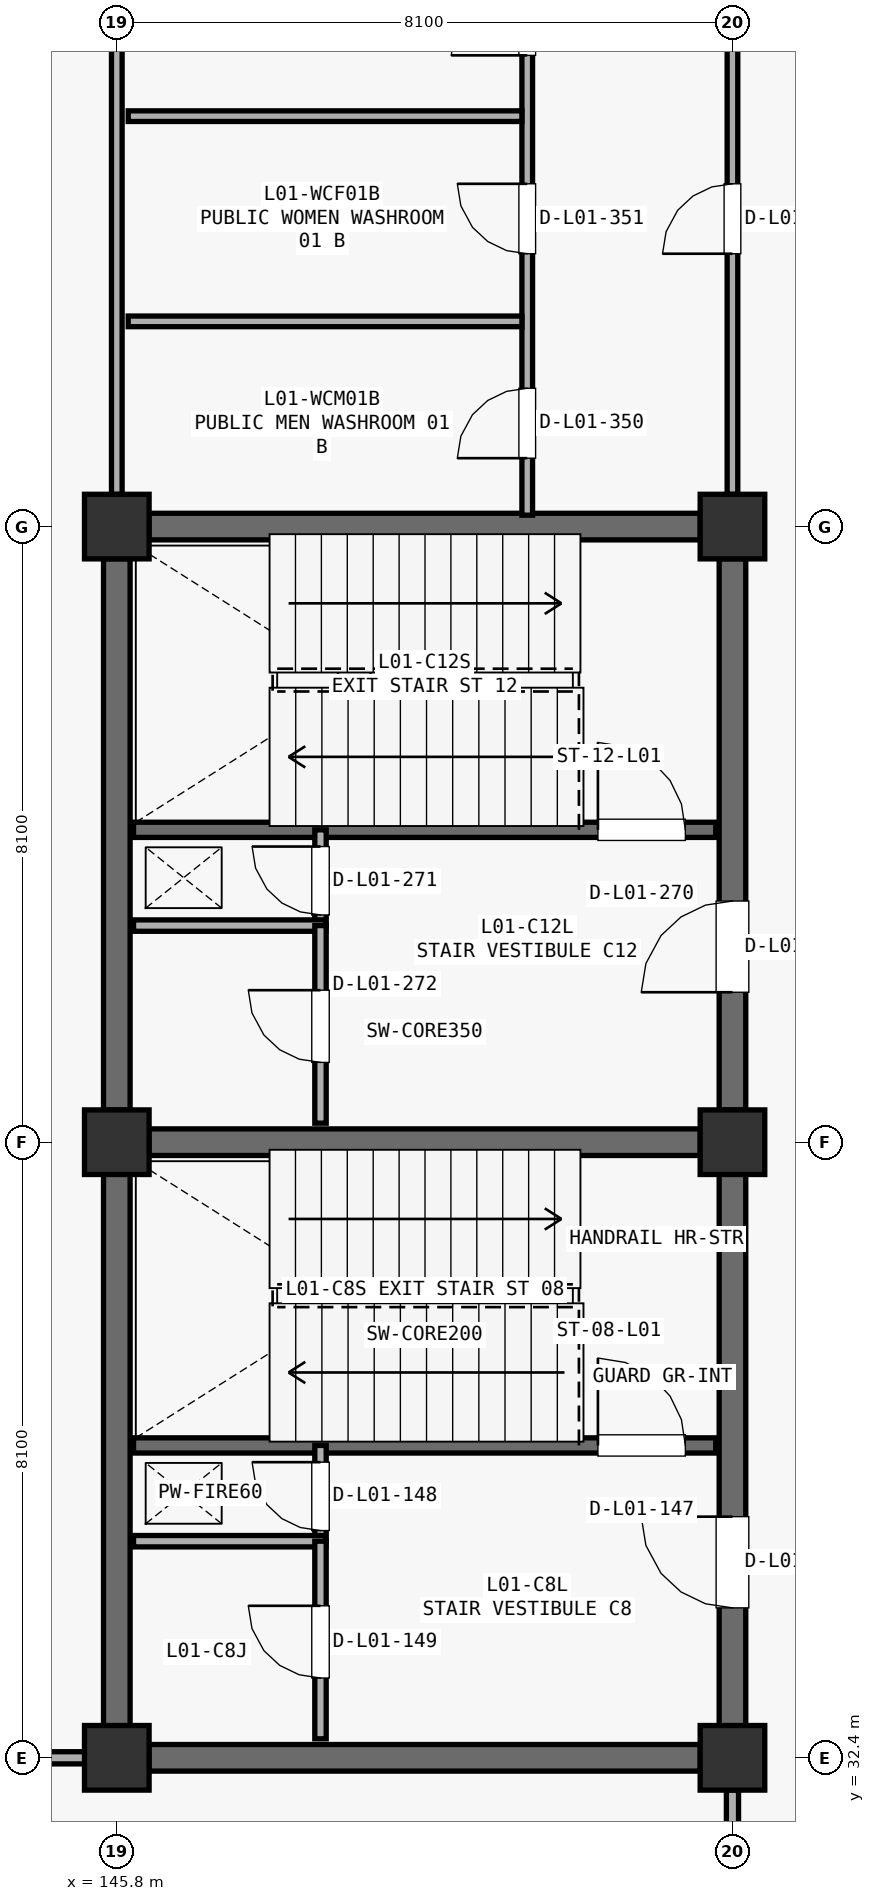
"""IFC4 building model, lengths in metres.
Left out: names, types, materials, properties, quantities, classifications, styles, units other than length and angle.
Written with IfcOpenShell. Run it as: python <this file> out.ifc"""

import sys

from ifc_helpers import new_model, si_unit, direction, frame, frame_2d, origin, origin_2d, place, context, subcontext, project, spatial, rectangle, extrude, element, fill, save


model = new_model("IFC4")
c1 = context("Model", 3, precision=1e-05, world=origin(), true_north=direction((0.0, 1.0)))
c2 = subcontext(c1, "Body", "Model", "MODEL_VIEW")
j1 = project(units=[si_unit("LENGTHUNIT", "METRE"), si_unit("PLANEANGLEUNIT", "RADIAN")], contexts=[c1])
p1 = place(None, origin())
s1 = spatial("IfcSite", under=j1, at=p1, CompositionType="ELEMENT")
p2 = place(p1, origin())
s2 = spatial("IfcBuilding", under=s1, at=p2, CompositionType="ELEMENT")
p3 = place(p2, frame((0.0, 0.0, 5.1)))
s3 = spatial("IfcBuildingStorey", under=s2, at=p3, CompositionType="ELEMENT", Elevation=5.1)
for number, where, z_axis, x_axis in (
    (1, (145.8, 32.4, 0.0), (0.0, 0.0, 1.0), (1.0, 0.0, 0.0)),
    (2, (145.8, 40.5, 0.0), (0.0, 0.0, 1.0), (1.0, 0.0, 0.0)),
    (3, (145.8, 48.6, 0.0), (0.0, 0.0, 1.0), (1.0, 0.0, 0.0)),
    (4, (153.9, 32.4, 0.0), (0.0, 0.0, 1.0), (1.0, 0.0, 0.0)),
    (5, (153.9, 40.5, 0.0), (0.0, 0.0, 1.0), (1.0, 0.0, 0.0)),
    (6, (153.9, 48.6, 0.0), (0.0, 0.0, 1.0), (1.0, 0.0, 0.0)),
):
    element("IfcColumn", number, at=place(p3, frame(where, z_axis=z_axis, x_axis=x_axis)), inside=s3, PredefinedType="COLUMN", context=c2, shape_type="SweptSolid", body=[
        extrude(rectangle(XDim=0.85, YDim=0.85, at=origin_2d()), origin(), (0.0, 0.0, 1.0), 4.59),
    ])
p4 = place(p3, frame((146.223, 40.5, 0.0), z_axis=(0.0, 0.0, 1.0), x_axis=(1.0, 0.0, 0.0)))
e7 = element("IfcWall", 7, at=p4, inside=s3, PredefinedType="SHEAR", context=c2, shape_type="SweptSolid", body=[
    extrude(rectangle(XDim=7.254, YDim=0.35, at=frame_2d((3.627, 0.0))), origin(), (0.0, 0.0, 1.0), 4.312),
])
p5 = place(p3, frame((145.8, 32.823, 0.0), z_axis=(0.0, 0.0, 1.0), x_axis=(0.0, 1.0, 0.0)))
e8 = element("IfcWall", 8, at=p5, inside=s3, PredefinedType="SHEAR", context=c2, shape_type="SweptSolid", body=[
    extrude(rectangle(XDim=7.254, YDim=0.35, at=frame_2d((3.627, 0.0))), origin(), (0.0, 0.0, 1.0), 4.312),
])
p6 = place(p3, frame((153.9, 32.823, 0.0), z_axis=(0.0, 0.0, 1.0), x_axis=(0.0, 1.0, 0.0)))
e9 = element("IfcWall", 9, at=p6, inside=s3, PredefinedType="SHEAR", context=c2, shape_type="SweptSolid", body=[
    extrude(rectangle(XDim=7.254, YDim=0.35, at=frame_2d((3.627, 0.0))), origin(), (0.0, 0.0, 1.0), 4.312),
])
p7 = place(p6, frame((1.55, 0.0, 0.0)))
e10 = element("IfcOpeningElement", 10, at=p7, cuts=e9, PredefinedType="OPENING", context=c2, shape_type="SweptSolid", body=[
    extrude(rectangle(XDim=1.2, YDim=2.2, at=frame_2d((0.6, 1.1))), frame((0.0, 0.185, 0.0), z_axis=(0.0, -1.0, 0.0), x_axis=(1.0, 0.0, 0.0)), (0.0, 0.0, 1.0), 0.37),
])
p8 = place(p3, frame((146.223, 32.4, 0.0), z_axis=(0.0, 0.0, 1.0), x_axis=(1.0, 0.0, 0.0)))
e11 = element("IfcWall", 11, at=p8, inside=s3, PredefinedType="SHEAR", context=c2, shape_type="SweptSolid", body=[
    extrude(rectangle(XDim=7.254, YDim=0.35, at=frame_2d((3.627, 0.0))), origin(), (0.0, 0.0, 1.0), 4.312),
])
p9 = place(p3, frame((146.02, 36.51, 0.0), z_axis=(0.0, 0.0, 1.0), x_axis=(1.0, 0.0, 0.0)))
e12 = element("IfcWall", 12, at=p9, inside=s3, PredefinedType="SHEAR", context=c2, shape_type="SweptSolid", body=[
    extrude(rectangle(XDim=7.66, YDim=0.2, at=frame_2d((3.83, 0.0))), origin(), (0.0, 0.0, 1.0), 4.312),
])
p10 = place(p9, frame((6.11, 0.0, 0.0)))
e13 = element("IfcOpeningElement", 13, at=p10, cuts=e12, PredefinedType="OPENING", context=c2, shape_type="SweptSolid", body=[
    extrude(rectangle(XDim=1.15, YDim=2.2, at=frame_2d((0.575, 1.1))), frame((0.0, 0.11, 0.0), z_axis=(0.0, -1.0, 0.0), x_axis=(1.0, 0.0, 0.0)), (0.0, 0.0, 1.0), 0.22),
])
p11 = place(p3, frame((148.48, 35.25, 0.0), z_axis=(0.0, 0.0, 1.0), x_axis=(0.0, 1.0, 0.0)))
e14 = element("IfcWall", 14, at=p11, inside=s3, PredefinedType="PARTITIONING", context=c2, shape_type="SweptSolid", body=[
    extrude(rectangle(XDim=1.26, YDim=0.15, at=frame_2d((0.63, 0.0))), origin(), (0.0, 0.0, 1.0), 4.312),
])
p12 = place(p11, frame((0.14, 0.0, 0.0)))
e15 = element("IfcOpeningElement", 15, at=p12, cuts=e14, PredefinedType="OPENING", context=c2, shape_type="SweptSolid", body=[
    extrude(rectangle(XDim=0.9, YDim=2.15, at=frame_2d((0.45, 1.075))), frame((0.0, 0.085, 0.0), z_axis=(0.0, -1.0, 0.0), x_axis=(1.0, 0.0, 0.0)), (0.0, 0.0, 1.0), 0.17),
])
p13 = place(p3, frame((146.02, 35.25, 0.0), z_axis=(0.0, 0.0, 1.0), x_axis=(1.0, 0.0, 0.0)))
e16 = element("IfcWall", 16, at=p13, inside=s3, PredefinedType="PARTITIONING", context=c2, shape_type="SweptSolid", body=[
    extrude(rectangle(XDim=2.53, YDim=0.15, at=frame_2d((1.265, 0.0))), origin(), (0.0, 0.0, 1.0), 4.312),
])
p14 = place(p3, frame((148.48, 32.65, 0.0), z_axis=(0.0, 0.0, 1.0), x_axis=(0.0, 1.0, 0.0)))
e17 = element("IfcWall", 17, at=p14, inside=s3, PredefinedType="PARTITIONING", context=c2, shape_type="SweptSolid", body=[
    extrude(rectangle(XDim=2.6, YDim=0.15, at=frame_2d((1.3, 0.0))), origin(), (0.0, 0.0, 1.0), 4.312),
])
p15 = place(p14, frame((0.8, 0.0, 0.0)))
e18 = element("IfcOpeningElement", 18, at=p15, cuts=e17, PredefinedType="OPENING", context=c2, shape_type="SweptSolid", body=[
    extrude(rectangle(XDim=0.95, YDim=2.15, at=frame_2d((0.475, 1.075))), frame((0.0, 0.085, 0.0), z_axis=(0.0, -1.0, 0.0), x_axis=(1.0, 0.0, 0.0)), (0.0, 0.0, 1.0), 0.17),
])
p16 = place(p3, frame((146.223, 48.6, 0.0), z_axis=(0.0, 0.0, 1.0), x_axis=(1.0, 0.0, 0.0)))
e19 = element("IfcWall", 19, at=p16, inside=s3, PredefinedType="SHEAR", context=c2, shape_type="SweptSolid", body=[
    extrude(rectangle(XDim=7.254, YDim=0.35, at=frame_2d((3.627, 0.0))), origin(), (0.0, 0.0, 1.0), 4.312),
])
p17 = place(p3, frame((145.8, 40.923, 0.0), z_axis=(0.0, 0.0, 1.0), x_axis=(0.0, 1.0, 0.0)))
e20 = element("IfcWall", 20, at=p17, inside=s3, PredefinedType="SHEAR", context=c2, shape_type="SweptSolid", body=[
    extrude(rectangle(XDim=7.254, YDim=0.35, at=frame_2d((3.627, 0.0))), origin(), (0.0, 0.0, 1.0), 4.312),
])
p18 = place(p3, frame((153.9, 40.923, 0.0), z_axis=(0.0, 0.0, 1.0), x_axis=(0.0, 1.0, 0.0)))
e21 = element("IfcWall", 21, at=p18, inside=s3, PredefinedType="SHEAR", context=c2, shape_type="SweptSolid", body=[
    extrude(rectangle(XDim=7.254, YDim=0.35, at=frame_2d((3.627, 0.0))), origin(), (0.0, 0.0, 1.0), 4.312),
])
p19 = place(p18, frame((1.55, 0.0, 0.0)))
e22 = element("IfcOpeningElement", 22, at=p19, cuts=e21, PredefinedType="OPENING", context=c2, shape_type="SweptSolid", body=[
    extrude(rectangle(XDim=1.2, YDim=2.2, at=frame_2d((0.6, 1.1))), frame((0.0, 0.185, 0.0), z_axis=(0.0, -1.0, 0.0), x_axis=(1.0, 0.0, 0.0)), (0.0, 0.0, 1.0), 0.37),
])
p20 = place(p3, frame((146.02, 44.61, 0.0), z_axis=(0.0, 0.0, 1.0), x_axis=(1.0, 0.0, 0.0)))
e23 = element("IfcWall", 23, at=p20, inside=s3, PredefinedType="SHEAR", context=c2, shape_type="SweptSolid", body=[
    extrude(rectangle(XDim=7.66, YDim=0.2, at=frame_2d((3.83, 0.0))), origin(), (0.0, 0.0, 1.0), 4.312),
])
p21 = place(p20, frame((6.11, 0.0, 0.0)))
e24 = element("IfcOpeningElement", 24, at=p21, cuts=e23, PredefinedType="OPENING", context=c2, shape_type="SweptSolid", body=[
    extrude(rectangle(XDim=1.15, YDim=2.2, at=frame_2d((0.575, 1.1))), frame((0.0, 0.11, 0.0), z_axis=(0.0, -1.0, 0.0), x_axis=(1.0, 0.0, 0.0)), (0.0, 0.0, 1.0), 0.22),
])
p22 = place(p3, frame((148.48, 43.35, 0.0), z_axis=(0.0, 0.0, 1.0), x_axis=(0.0, 1.0, 0.0)))
e25 = element("IfcWall", 25, at=p22, inside=s3, PredefinedType="PARTITIONING", context=c2, shape_type="SweptSolid", body=[
    extrude(rectangle(XDim=1.26, YDim=0.15, at=frame_2d((0.63, 0.0))), origin(), (0.0, 0.0, 1.0), 4.312),
])
p23 = place(p22, frame((0.14, 0.0, 0.0)))
e26 = element("IfcOpeningElement", 26, at=p23, cuts=e25, PredefinedType="OPENING", context=c2, shape_type="SweptSolid", body=[
    extrude(rectangle(XDim=0.9, YDim=2.15, at=frame_2d((0.45, 1.075))), frame((0.0, 0.085, 0.0), z_axis=(0.0, -1.0, 0.0), x_axis=(1.0, 0.0, 0.0)), (0.0, 0.0, 1.0), 0.17),
])
p24 = place(p3, frame((146.02, 43.35, 0.0), z_axis=(0.0, 0.0, 1.0), x_axis=(1.0, 0.0, 0.0)))
e27 = element("IfcWall", 27, at=p24, inside=s3, PredefinedType="PARTITIONING", context=c2, shape_type="SweptSolid", body=[
    extrude(rectangle(XDim=2.53, YDim=0.15, at=frame_2d((1.265, 0.0))), origin(), (0.0, 0.0, 1.0), 4.312),
])
p25 = place(p3, frame((148.48, 40.75, 0.0), z_axis=(0.0, 0.0, 1.0), x_axis=(0.0, 1.0, 0.0)))
e28 = element("IfcWall", 28, at=p25, inside=s3, PredefinedType="PARTITIONING", context=c2, shape_type="SweptSolid", body=[
    extrude(rectangle(XDim=2.6, YDim=0.15, at=frame_2d((1.3, 0.0))), origin(), (0.0, 0.0, 1.0), 4.312),
])
p26 = place(p25, frame((0.8, 0.0, 0.0)))
e29 = element("IfcOpeningElement", 29, at=p26, cuts=e28, PredefinedType="OPENING", context=c2, shape_type="SweptSolid", body=[
    extrude(rectangle(XDim=0.95, YDim=2.15, at=frame_2d((0.475, 1.075))), frame((0.0, 0.085, 0.0), z_axis=(0.0, -1.0, 0.0), x_axis=(1.0, 0.0, 0.0)), (0.0, 0.0, 1.0), 0.17),
])
p27 = place(p3, frame((145.8, 49.023, 0.0), z_axis=(0.0, 0.0, 1.0), x_axis=(0.0, 1.0, 0.0)))
e30 = element("IfcWall", 30, at=p27, inside=s3, PredefinedType="PARTITIONING", context=c2, shape_type="SweptSolid", body=[
    extrude(rectangle(XDim=7.254, YDim=0.14, at=frame_2d((3.627, 0.0))), origin(), (0.0, 0.0, 1.0), 3.36),
])
p28 = place(p3, frame((153.9, 49.023, 0.0), z_axis=(0.0, 0.0, 1.0), x_axis=(0.0, 1.0, 0.0)))
e31 = element("IfcWall", 31, at=p28, inside=s3, PredefinedType="PARTITIONING", context=c2, shape_type="SweptSolid", body=[
    extrude(rectangle(XDim=7.254, YDim=0.14, at=frame_2d((3.627, 0.0))), origin(), (0.0, 0.0, 1.0), 3.66),
])
p29 = place(p28, frame((3.167, 0.0, 0.0)))
e32 = element("IfcOpeningElement", 32, at=p29, cuts=e31, PredefinedType="OPENING", context=c2, shape_type="SweptSolid", body=[
    extrude(rectangle(XDim=0.92, YDim=2.15, at=frame_2d((0.46, 1.075))), frame((0.0, 0.08, 0.0), z_axis=(0.0, -1.0, 0.0), x_axis=(1.0, 0.0, 0.0)), (0.0, 0.0, 1.0), 0.16),
])
p30 = place(p3, frame((151.2, 48.75, 0.0), z_axis=(0.0, 0.0, 1.0), x_axis=(0.0, 1.0, 0.0)))
e33 = element("IfcWall", 33, at=p30, inside=s3, PredefinedType="PARTITIONING", context=c2, shape_type="SweptSolid", body=[
    extrude(rectangle(XDim=7.8, YDim=0.14, at=frame_2d((3.9, 0.0))), origin(), (0.0, 0.0, 1.0), 4.312),
])
p31 = place(p30, frame((0.75, 0.0, 0.0)))
e34 = element("IfcOpeningElement", 34, at=p31, cuts=e33, PredefinedType="OPENING", context=c2, shape_type="SweptSolid", body=[
    extrude(rectangle(XDim=0.92, YDim=2.15, at=frame_2d((0.46, 1.075))), frame((0.0, 0.08, 0.0), z_axis=(0.0, -1.0, 0.0), x_axis=(1.0, 0.0, 0.0)), (0.0, 0.0, 1.0), 0.16),
])
p32 = place(p30, frame((3.44, 0.0, 0.0)))
e35 = element("IfcOpeningElement", 35, at=p32, cuts=e33, PredefinedType="OPENING", context=c2, shape_type="SweptSolid", body=[
    extrude(rectangle(XDim=0.92, YDim=2.15, at=frame_2d((0.46, 1.075))), frame((0.0, 0.08, 0.0), z_axis=(0.0, -1.0, 0.0), x_axis=(1.0, 0.0, 0.0)), (0.0, 0.0, 1.0), 0.16),
])
p33 = place(p30, frame((6.05, 0.0, 0.0)))
e36 = element("IfcOpeningElement", 36, at=p33, cuts=e33, PredefinedType="OPENING", context=c2, shape_type="SweptSolid", body=[
    extrude(rectangle(XDim=1.0, YDim=2.15, at=frame_2d((0.5, 1.075))), frame((0.0, 0.08, 0.0), z_axis=(0.0, -1.0, 0.0), x_axis=(1.0, 0.0, 0.0)), (0.0, 0.0, 1.0), 0.16),
])
for number, where, z_axis, x_axis in (
    (37, (145.95, 51.3, 0.0), (0.0, 0.0, 1.0), (1.0, 0.0, 0.0)),
    (38, (145.95, 54.0, 0.0), (0.0, 0.0, 1.0), (1.0, 0.0, 0.0)),
):
    element("IfcWall", number, at=place(p3, frame(where, z_axis=z_axis, x_axis=x_axis)), inside=s3, PredefinedType="PARTITIONING", context=c2, shape_type="SweptSolid", body=[
        extrude(rectangle(XDim=5.18, YDim=0.14, at=frame_2d((2.59, 0.0))), origin(), (0.0, 0.0, 1.0), 4.312),
    ])
p34 = place(p3, frame((153.9, 24.723, 0.0), z_axis=(0.0, 0.0, 1.0), x_axis=(0.0, 1.0, 0.0)))
e39 = element("IfcWall", 39, at=p34, inside=s3, PredefinedType="PARTITIONING", context=c2, shape_type="SweptSolid", body=[
    extrude(rectangle(XDim=7.254, YDim=0.16, at=frame_2d((3.627, 0.0))), origin(), (0.0, 0.0, 1.0), 3.462),
])
p35 = place(p3, frame((138.123, 32.4, 0.0), z_axis=(0.0, 0.0, 1.0), x_axis=(1.0, 0.0, 0.0)))
e40 = element("IfcWall", 40, at=p35, inside=s3, PredefinedType="PARTITIONING", context=c2, shape_type="SweptSolid", body=[
    extrude(rectangle(XDim=7.254, YDim=0.16, at=frame_2d((3.627, 0.0))), origin(), (0.0, 0.0, 1.0), 3.462),
])
p36 = place(p7, origin())
e41 = element("IfcDoor", 41, at=p36, inside=s3, OperationType="SINGLE_SWING_RIGHT", PredefinedType="DOOR", context=c2, shape_type="SweptSolid", body=[
    extrude(rectangle(XDim=1.2, YDim=2.2, at=frame_2d((0.6, 1.1))), frame((0.0, 0.025, 0.0), z_axis=(0.0, -1.0, 0.0), x_axis=(1.0, 0.0, 0.0)), (0.0, 0.0, 1.0), 0.05),
])
fill(e10, e41)
p37 = place(p10, origin())
e42 = element("IfcDoor", 42, at=p37, inside=s3, OperationType="SINGLE_SWING_LEFT", PredefinedType="DOOR", context=c2, shape_type="SweptSolid", body=[
    extrude(rectangle(XDim=1.15, YDim=2.2, at=frame_2d((0.575, 1.1))), frame((0.0, 0.025, 0.0), z_axis=(0.0, -1.0, 0.0), x_axis=(1.0, 0.0, 0.0)), (0.0, 0.0, 1.0), 0.05),
])
fill(e13, e42)
p38 = place(p12, origin())
e43 = element("IfcDoor", 43, at=p38, inside=s3, OperationType="SINGLE_SWING_RIGHT", PredefinedType="DOOR", context=c2, shape_type="SweptSolid", body=[
    extrude(rectangle(XDim=0.9, YDim=2.15, at=frame_2d((0.45, 1.075))), frame((0.0, 0.025, 0.0), z_axis=(0.0, -1.0, 0.0), x_axis=(1.0, 0.0, 0.0)), (0.0, 0.0, 1.0), 0.05),
])
fill(e15, e43)
p39 = place(p15, origin())
e44 = element("IfcDoor", 44, at=p39, inside=s3, OperationType="SINGLE_SWING_RIGHT", PredefinedType="DOOR", context=c2, shape_type="SweptSolid", body=[
    extrude(rectangle(XDim=0.95, YDim=2.15, at=frame_2d((0.475, 1.075))), frame((0.0, 0.025, 0.0), z_axis=(0.0, -1.0, 0.0), x_axis=(1.0, 0.0, 0.0)), (0.0, 0.0, 1.0), 0.05),
])
fill(e18, e44)
p40 = place(p19, origin())
e45 = element("IfcDoor", 45, at=p40, inside=s3, OperationType="SINGLE_SWING_LEFT", PredefinedType="DOOR", context=c2, shape_type="SweptSolid", body=[
    extrude(rectangle(XDim=1.2, YDim=2.2, at=frame_2d((0.6, 1.1))), frame((0.0, 0.025, 0.0), z_axis=(0.0, -1.0, 0.0), x_axis=(1.0, 0.0, 0.0)), (0.0, 0.0, 1.0), 0.05),
])
fill(e22, e45)
p41 = place(p21, origin())
e46 = element("IfcDoor", 46, at=p41, inside=s3, OperationType="SINGLE_SWING_LEFT", PredefinedType="DOOR", context=c2, shape_type="SweptSolid", body=[
    extrude(rectangle(XDim=1.15, YDim=2.2, at=frame_2d((0.575, 1.1))), frame((0.0, 0.025, 0.0), z_axis=(0.0, -1.0, 0.0), x_axis=(1.0, 0.0, 0.0)), (0.0, 0.0, 1.0), 0.05),
])
fill(e24, e46)
p42 = place(p23, origin())
e47 = element("IfcDoor", 47, at=p42, inside=s3, OperationType="SINGLE_SWING_RIGHT", PredefinedType="DOOR", context=c2, shape_type="SweptSolid", body=[
    extrude(rectangle(XDim=0.9, YDim=2.15, at=frame_2d((0.45, 1.075))), frame((0.0, 0.025, 0.0), z_axis=(0.0, -1.0, 0.0), x_axis=(1.0, 0.0, 0.0)), (0.0, 0.0, 1.0), 0.05),
])
fill(e26, e47)
p43 = place(p26, origin())
e48 = element("IfcDoor", 48, at=p43, inside=s3, OperationType="SINGLE_SWING_RIGHT", PredefinedType="DOOR", context=c2, shape_type="SweptSolid", body=[
    extrude(rectangle(XDim=0.95, YDim=2.15, at=frame_2d((0.475, 1.075))), frame((0.0, 0.025, 0.0), z_axis=(0.0, -1.0, 0.0), x_axis=(1.0, 0.0, 0.0)), (0.0, 0.0, 1.0), 0.05),
])
fill(e29, e48)
p44 = place(p29, origin())
e49 = element("IfcDoor", 49, at=p44, inside=s3, OperationType="SINGLE_SWING_LEFT", PredefinedType="DOOR", context=c2, shape_type="SweptSolid", body=[
    extrude(rectangle(XDim=0.92, YDim=2.15, at=frame_2d((0.46, 1.075))), frame((0.0, 0.025, 0.0), z_axis=(0.0, -1.0, 0.0), x_axis=(1.0, 0.0, 0.0)), (0.0, 0.0, 1.0), 0.05),
])
fill(e32, e49)
p45 = place(p31, origin())
e50 = element("IfcDoor", 50, at=p45, inside=s3, OperationType="SINGLE_SWING_LEFT", PredefinedType="DOOR", context=c2, shape_type="SweptSolid", body=[
    extrude(rectangle(XDim=0.92, YDim=2.15, at=frame_2d((0.46, 1.075))), frame((0.0, 0.025, 0.0), z_axis=(0.0, -1.0, 0.0), x_axis=(1.0, 0.0, 0.0)), (0.0, 0.0, 1.0), 0.05),
])
fill(e34, e50)
p46 = place(p32, origin())
e51 = element("IfcDoor", 51, at=p46, inside=s3, OperationType="SINGLE_SWING_RIGHT", PredefinedType="DOOR", context=c2, shape_type="SweptSolid", body=[
    extrude(rectangle(XDim=0.92, YDim=2.15, at=frame_2d((0.46, 1.075))), frame((0.0, 0.025, 0.0), z_axis=(0.0, -1.0, 0.0), x_axis=(1.0, 0.0, 0.0)), (0.0, 0.0, 1.0), 0.05),
])
fill(e35, e51)
p47 = place(p33, origin())
e52 = element("IfcDoor", 52, at=p47, inside=s3, OperationType="SINGLE_SWING_LEFT", PredefinedType="DOOR", context=c2, shape_type="SweptSolid", body=[
    extrude(rectangle(XDim=1.0, YDim=2.15, at=frame_2d((0.5, 1.075))), frame((0.0, 0.025, 0.0), z_axis=(0.0, -1.0, 0.0), x_axis=(1.0, 0.0, 0.0)), (0.0, 0.0, 1.0), 0.05),
])
fill(e36, e52)
save(model, sys.argv[1])
